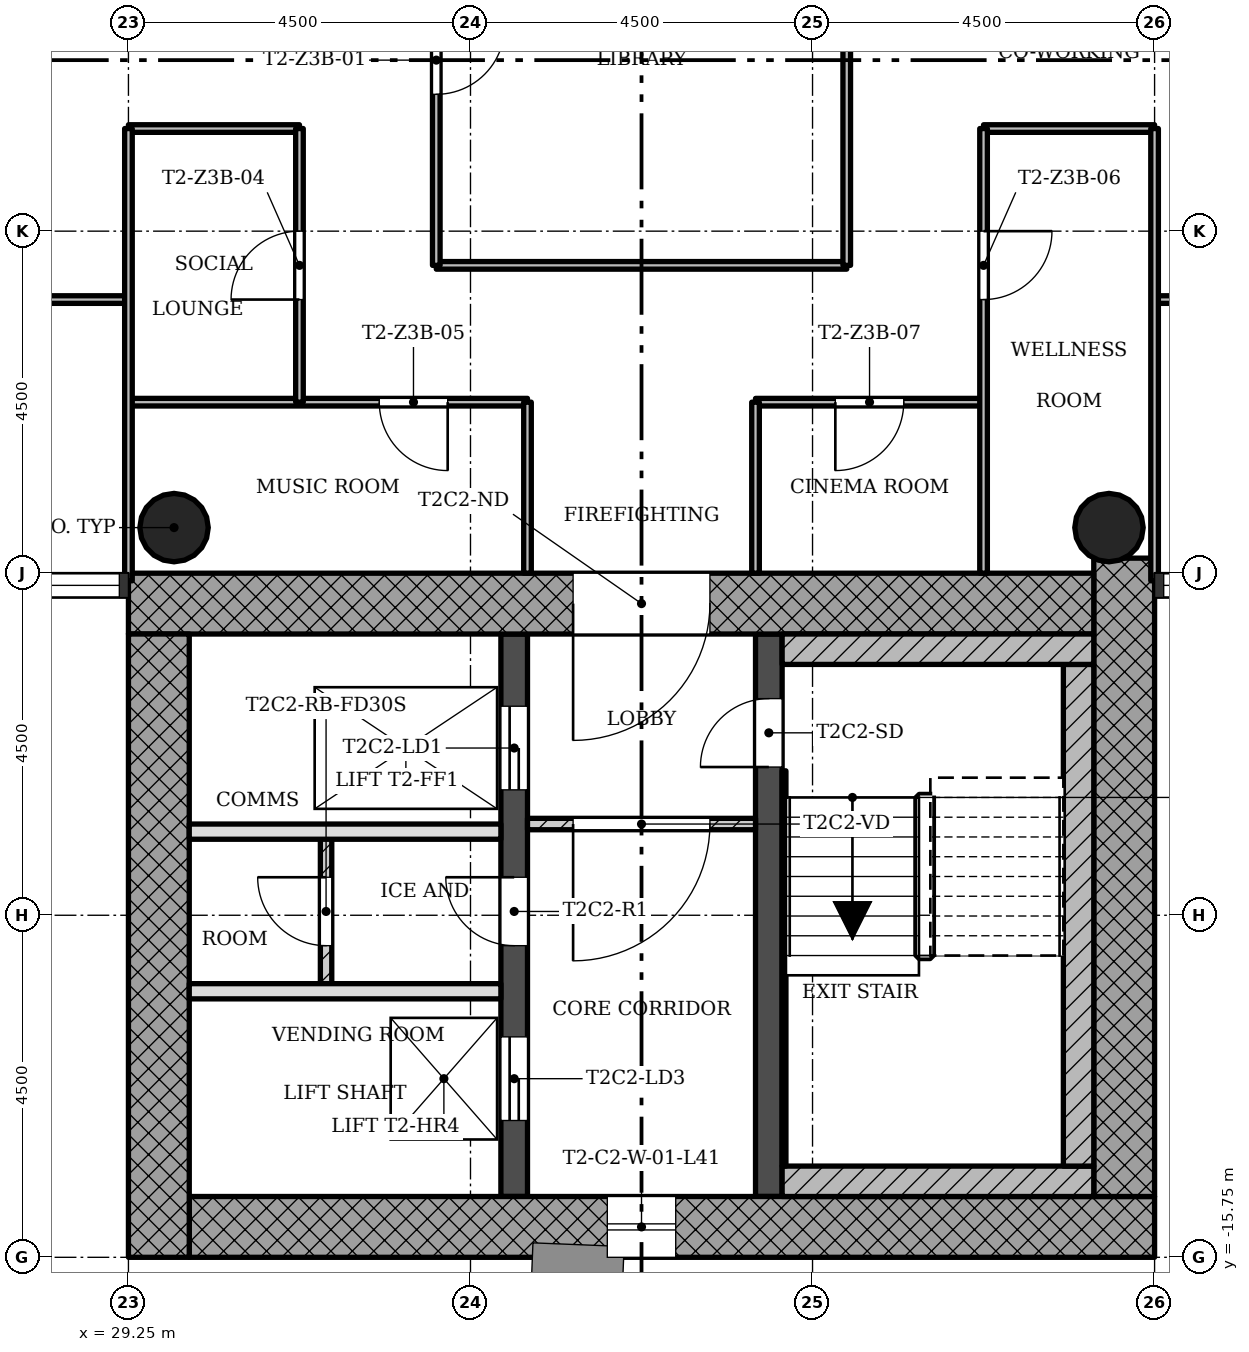
"""IFC4 building model, lengths in metres.
Left out: names, types, materials, properties, quantities, classifications, styles, units other than length and angle.
Written with IfcOpenShell. Run it as: python <this file> out.ifc"""

import sys

from ifc_helpers import new_model, si_unit, direction, frame, frame_2d, origin, origin_2d, place, context, subcontext, project, spatial, rectangle, hollow_circle, extrude, element, fill, save


model = new_model("IFC4")
c1 = context("Model", 3, precision=1e-05, world=origin(), true_north=direction((0.0, 1.0)))
c2 = subcontext(c1, "Body", "Model", "MODEL_VIEW")
j1 = project(units=[si_unit("LENGTHUNIT", "METRE"), si_unit("PLANEANGLEUNIT", "RADIAN")], contexts=[c1])
p1 = place(None, origin())
s1 = spatial("IfcSite", under=j1, at=p1, CompositionType="ELEMENT")
p2 = place(p1, origin())
s2 = spatial("IfcBuilding", under=s1, at=p2, CompositionType="ELEMENT")
p3 = place(p2, frame((0.0, 0.0, 150.7)))
s3 = spatial("IfcBuildingStorey", under=s2, at=p3, CompositionType="ELEMENT", Elevation=150.7)
p4 = place(p3, frame((30.05, -15.35, 0.0), z_axis=(0.0, 0.0, 1.0), x_axis=(1.0, 0.0, 0.0)))
e1 = element("IfcWall", 1, at=p4, inside=s3, PredefinedType="SHEAR", context=c2, shape_type="SweptSolid", body=[
    extrude(rectangle(XDim=12.7, YDim=0.8, at=frame_2d((6.35, 0.0))), origin(), (0.0, 0.0, 1.0), 3.4),
])
p5 = place(p4, frame((5.5, 0.0, 0.45)))
e2 = element("IfcOpeningElement", 2, at=p5, cuts=e1, PredefinedType="OPENING", context=c2, shape_type="SweptSolid", body=[
    extrude(rectangle(XDim=0.9, YDim=2.4, at=frame_2d((0.45, 1.2))), frame((0.0, 0.41, 0.0), z_axis=(0.0, -1.0, 0.0), x_axis=(1.0, 0.0, 0.0)), (0.0, 0.0, 1.0), 0.82),
])
p6 = place(p3, frame((42.35, -14.95, 0.0), z_axis=(0.0, 0.0, 1.0), x_axis=(0.0, 1.0, 0.0)))
e3 = element("IfcWall", 3, at=p6, inside=s3, PredefinedType="SHEAR", context=c2, shape_type="SweptSolid", body=[
    extrude(rectangle(XDim=8.398, YDim=0.8, at=frame_2d((4.199, 0.0))), origin(), (0.0, 0.0, 1.0), 3.4),
])
p7 = place(p3, frame((41.95, -7.15, 0.0), z_axis=(0.0, 0.0, 1.0), x_axis=(-1.0, 0.0, 0.0)))
e4 = element("IfcWall", 4, at=p7, inside=s3, PredefinedType="SHEAR", context=c2, shape_type="SweptSolid", body=[
    extrude(rectangle(XDim=12.7, YDim=0.8, at=frame_2d((6.35, 0.0))), origin(), (0.0, 0.0, 1.0), 3.4),
])
p8 = place(p7, frame((5.05, 0.0, 0.0)))
e5 = element("IfcOpeningElement", 5, at=p8, cuts=e4, PredefinedType="OPENING", context=c2, shape_type="SweptSolid", body=[
    extrude(rectangle(XDim=1.8, YDim=2.1, at=frame_2d((0.9, 1.05))), frame((0.0, 0.41, 0.0), z_axis=(0.0, -1.0, 0.0), x_axis=(1.0, 0.0, 0.0)), (0.0, 0.0, 1.0), 0.82),
])
p9 = place(p3, frame((29.65, -7.55, 0.0), z_axis=(0.0, 0.0, 1.0), x_axis=(0.0, -1.0, 0.0)))
e6 = element("IfcWall", 6, at=p9, inside=s3, PredefinedType="SHEAR", context=c2, shape_type="SweptSolid", body=[
    extrude(rectangle(XDim=8.2, YDim=0.8, at=frame_2d((4.1, 0.0))), origin(), (0.0, 0.0, 1.0), 3.4),
])
p10 = place(p3, frame((34.325, -14.95, 0.0), z_axis=(0.0, 0.0, 1.0), x_axis=(0.0, 1.0, 0.0)))
e7 = element("IfcWall", 7, at=p10, inside=s3, PredefinedType="SHEAR", context=c2, shape_type="SweptSolid", body=[
    extrude(rectangle(XDim=7.4, YDim=0.35, at=frame_2d((3.7, 0.0))), origin(), (0.0, 0.0, 1.0), 3.4),
])
p11 = place(p10, frame((5.35, 0.0, 0.0)))
e8 = element("IfcOpeningElement", 8, at=p11, cuts=e7, PredefinedType="OPENING", context=c2, shape_type="SweptSolid", body=[
    extrude(rectangle(XDim=1.1, YDim=2.1, at=frame_2d((0.55, 1.05))), frame((0.0, 0.185, 0.0), z_axis=(0.0, -1.0, 0.0), x_axis=(1.0, 0.0, 0.0)), (0.0, 0.0, 1.0), 0.37),
])
p12 = place(p10, frame((1.0, 0.0, 0.0)))
e9 = element("IfcOpeningElement", 9, at=p12, cuts=e7, PredefinedType="OPENING", context=c2, shape_type="SweptSolid", body=[
    extrude(rectangle(XDim=1.1, YDim=2.1, at=frame_2d((0.55, 1.05))), frame((0.0, 0.185, 0.0), z_axis=(0.0, -1.0, 0.0), x_axis=(1.0, 0.0, 0.0)), (0.0, 0.0, 1.0), 0.37),
])
p13 = place(p10, frame((3.3, 0.0, 0.0)))
e10 = element("IfcOpeningElement", 10, at=p13, cuts=e7, PredefinedType="OPENING", context=c2, shape_type="SweptSolid", body=[
    extrude(rectangle(XDim=0.9, YDim=2.1, at=frame_2d((0.45, 1.05))), frame((0.0, 0.185, 0.0), z_axis=(0.0, -1.0, 0.0), x_axis=(1.0, 0.0, 0.0)), (0.0, 0.0, 1.0), 0.37),
])
p14 = place(p3, frame((37.675, -14.95, 0.0), z_axis=(0.0, 0.0, 1.0), x_axis=(0.0, 1.0, 0.0)))
e11 = element("IfcWall", 11, at=p14, inside=s3, PredefinedType="SHEAR", context=c2, shape_type="SweptSolid", body=[
    extrude(rectangle(XDim=7.4, YDim=0.35, at=frame_2d((3.7, 0.0))), origin(), (0.0, 0.0, 1.0), 3.4),
])
p15 = place(p14, frame((5.65, 0.0, 0.0)))
e12 = element("IfcOpeningElement", 12, at=p15, cuts=e11, PredefinedType="OPENING", context=c2, shape_type="SweptSolid", body=[
    extrude(rectangle(XDim=0.9, YDim=2.1, at=frame_2d((0.45, 1.05))), frame((0.0, 0.185, 0.0), z_axis=(0.0, -1.0, 0.0), x_axis=(1.0, 0.0, 0.0)), (0.0, 0.0, 1.0), 0.37),
])
for number, where, z_axis, x_axis in (
    (13, (42.15, -6.15, 0.0), (0.0, 0.0, 1.0), (1.0, 0.0, 0.0)),
    (14, (29.85, -6.15, 0.0), (0.0, 0.0, 1.0), (1.0, 0.0, 0.0)),
):
    element("IfcColumn", number, at=place(p3, frame(where, z_axis=z_axis, x_axis=x_axis)), inside=s3, PredefinedType="COLUMN", context=c2, shape_type="SweptSolid", body=[
        extrude(hollow_circle(Radius=0.45, WallThickness=0.032, at=origin_2d()), origin(), (0.0, 0.0, 1.0), 3.4),
    ])
p16 = place(p3, frame((34.5, -10.05, 0.0), z_axis=(0.0, 0.0, 1.0), x_axis=(1.0, 0.0, 0.0)))
e15 = element("IfcWall", 15, at=p16, inside=s3, PredefinedType="PARTITIONING", context=c2, shape_type="SweptSolid", body=[
    extrude(rectangle(XDim=3.0, YDim=0.15, at=frame_2d((1.5, 0.0))), origin(), (0.0, 0.0, 1.0), 3.0),
])
p17 = place(p16, frame((0.6, 0.0, 0.0)))
e16 = element("IfcOpeningElement", 16, at=p17, cuts=e15, PredefinedType="OPENING", context=c2, shape_type="SweptSolid", body=[
    extrude(rectangle(XDim=1.8, YDim=2.1, at=frame_2d((0.9, 1.05))), frame((0.0, 0.085, 0.0), z_axis=(0.0, -1.0, 0.0), x_axis=(1.0, 0.0, 0.0)), (0.0, 0.0, 1.0), 0.17),
])
for number, where, z_axis, x_axis in (
    (17, (30.05, -12.25, 0.0), (0.0, 0.0, 1.0), (1.0, 0.0, 0.0)),
    (18, (30.05, -10.15, 0.0), (0.0, 0.0, 1.0), (1.0, 0.0, 0.0)),
):
    element("IfcWall", number, at=place(p3, frame(where, z_axis=z_axis, x_axis=x_axis)), inside=s3, PredefinedType="SOLIDWALL", context=c2, shape_type="SweptSolid", body=[
        extrude(rectangle(XDim=4.1, YDim=0.2, at=frame_2d((2.05, 0.0))), origin(), (0.0, 0.0, 1.0), 3.0),
    ])
p18 = place(p3, frame((31.85, -10.15, 0.0), z_axis=(0.0, 0.0, 1.0), x_axis=(0.0, -1.0, 0.0)))
e19 = element("IfcWall", 19, at=p18, inside=s3, PredefinedType="PARTITIONING", context=c2, shape_type="SweptSolid", body=[
    extrude(rectangle(XDim=2.1, YDim=0.15, at=frame_2d((1.05, 0.0))), origin(), (0.0, 0.0, 1.0), 3.0),
])
p19 = place(p18, frame((0.6, 0.0, 0.0)))
e20 = element("IfcOpeningElement", 20, at=p19, cuts=e19, PredefinedType="OPENING", context=c2, shape_type="SweptSolid", body=[
    extrude(rectangle(XDim=0.9, YDim=2.1, at=frame_2d((0.45, 1.05))), frame((0.0, 0.085, 0.0), z_axis=(0.0, -1.0, 0.0), x_axis=(1.0, 0.0, 0.0)), (0.0, 0.0, 1.0), 0.17),
])
p20 = place(p3, frame((40.5, -4.5, 0.0), z_axis=(0.0, 0.0, 1.0), x_axis=(-1.0, 0.0, 0.0)))
e21 = element("IfcWall", 21, at=p20, inside=s3, PredefinedType="PARTITIONING", context=c2, shape_type="SweptSolid", body=[
    extrude(rectangle(XDim=3.0, YDim=0.1, at=frame_2d((1.5, 0.0))), origin(), (0.0, 0.0, 1.0), 3.0),
])
p21 = place(p20, frame((1.05, 0.0, 0.0)))
e22 = element("IfcOpeningElement", 22, at=p21, cuts=e21, PredefinedType="OPENING", context=c2, shape_type="SweptSolid", body=[
    extrude(rectangle(XDim=0.9, YDim=2.1, at=frame_2d((0.45, 1.05))), frame((0.0, 0.06, 0.0), z_axis=(0.0, -1.0, 0.0), x_axis=(1.0, 0.0, 0.0)), (0.0, 0.0, 1.0), 0.12),
])
p22 = place(p3, frame((34.5, -4.5, 0.0), z_axis=(0.0, 0.0, 1.0), x_axis=(-1.0, 0.0, 0.0)))
e23 = element("IfcWall", 23, at=p22, inside=s3, PredefinedType="PARTITIONING", context=c2, shape_type="SweptSolid", body=[
    extrude(rectangle(XDim=5.25, YDim=0.1, at=frame_2d((2.625, 0.0))), origin(), (0.0, 0.0, 1.0), 3.0),
])
p23 = place(p22, frame((1.05, 0.0, 0.0)))
e24 = element("IfcOpeningElement", 24, at=p23, cuts=e23, PredefinedType="OPENING", context=c2, shape_type="SweptSolid", body=[
    extrude(rectangle(XDim=0.9, YDim=2.1, at=frame_2d((0.45, 1.05))), frame((0.0, 0.06, 0.0), z_axis=(0.0, -1.0, 0.0), x_axis=(1.0, 0.0, 0.0)), (0.0, 0.0, 1.0), 0.12),
])
p24 = place(p3, frame((47.25, -3.15, 0.0), z_axis=(0.0, 0.0, 1.0), x_axis=(-1.0, 0.0, 0.0)))
e25 = element("IfcWall", 25, at=p24, inside=s3, PredefinedType="PARTITIONING", context=c2, shape_type="SweptSolid", body=[
    extrude(rectangle(XDim=4.5, YDim=0.1, at=frame_2d((2.25, 0.0))), origin(), (0.0, 0.0, 1.0), 3.0),
])
p25 = place(p24, frame((1.8, 0.0, 0.0)))
e26 = element("IfcOpeningElement", 26, at=p25, cuts=e25, PredefinedType="OPENING", context=c2, shape_type="SweptSolid", body=[
    extrude(rectangle(XDim=0.9, YDim=2.1, at=frame_2d((0.45, 1.05))), frame((0.0, 0.06, 0.0), z_axis=(0.0, -1.0, 0.0), x_axis=(1.0, 0.0, 0.0)), (0.0, 0.0, 1.0), 0.12),
])
p26 = place(p3, frame((29.25, -3.15, 0.0), z_axis=(0.0, 0.0, 1.0), x_axis=(-1.0, 0.0, 0.0)))
e27 = element("IfcWall", 27, at=p26, inside=s3, PredefinedType="PARTITIONING", context=c2, shape_type="SweptSolid", body=[
    extrude(rectangle(XDim=9.0, YDim=0.1, at=frame_2d((4.5, 0.0))), origin(), (0.0, 0.0, 1.0), 3.0),
])
p27 = place(p26, frame((1.8, 0.0, 0.0)))
e28 = element("IfcOpeningElement", 28, at=p27, cuts=e27, PredefinedType="OPENING", context=c2, shape_type="SweptSolid", body=[
    extrude(rectangle(XDim=0.9, YDim=2.1, at=frame_2d((0.45, 1.05))), frame((0.0, 0.06, 0.0), z_axis=(0.0, -1.0, 0.0), x_axis=(1.0, 0.0, 0.0)), (0.0, 0.0, 1.0), 0.12),
])
p28 = place(p26, frame((6.3, 0.0, 0.0)))
e29 = element("IfcOpeningElement", 29, at=p28, cuts=e27, PredefinedType="OPENING", context=c2, shape_type="SweptSolid", body=[
    extrude(rectangle(XDim=0.9, YDim=2.1, at=frame_2d((0.45, 1.05))), frame((0.0, 0.06, 0.0), z_axis=(0.0, -1.0, 0.0), x_axis=(1.0, 0.0, 0.0)), (0.0, 0.0, 1.0), 0.12),
])
p29 = place(p3, frame((38.7, -2.7, 0.0), z_axis=(0.0, 0.0, 1.0), x_axis=(-1.0, 0.0, 0.0)))
e30 = element("IfcWall", 30, at=p29, inside=s3, PredefinedType="PARTITIONING", context=c2, shape_type="SweptSolid", body=[
    extrude(rectangle(XDim=5.4, YDim=0.1, at=frame_2d((2.7, 0.0))), origin(), (0.0, 0.0, 1.0), 3.0),
])
for number, where, z_axis, x_axis in (
    (31, (42.75, -0.9, 0.0), (0.0, 0.0, 1.0), (-1.0, 0.0, 0.0)),
    (32, (31.5, -0.9, 0.0), (0.0, 0.0, 1.0), (-1.0, 0.0, 0.0)),
):
    element("IfcWall", number, at=place(p3, frame(where, z_axis=z_axis, x_axis=x_axis)), inside=s3, PredefinedType="PARTITIONING", context=c2, shape_type="SweptSolid", body=[
        extrude(rectangle(XDim=2.25, YDim=0.1, at=frame_2d((1.125, 0.0))), origin(), (0.0, 0.0, 1.0), 3.0),
    ])
p30 = place(p3, frame((42.75, -6.85, 0.0), z_axis=(0.0, 0.0, 1.0), x_axis=(0.0, 1.0, 0.0)))
e33 = element("IfcWall", 33, at=p30, inside=s3, PredefinedType="PARTITIONING", context=c2, shape_type="SweptSolid", body=[
    extrude(rectangle(XDim=5.95, YDim=0.1, at=frame_2d((2.975, 0.0))), origin(), (0.0, 0.0, 1.0), 3.0),
])
p31 = place(p3, frame((40.5, -6.75, 0.0), z_axis=(0.0, 0.0, 1.0), x_axis=(0.0, 1.0, 0.0)))
e34 = element("IfcWall", 34, at=p31, inside=s3, PredefinedType="PARTITIONING", context=c2, shape_type="SweptSolid", body=[
    extrude(rectangle(XDim=5.85, YDim=0.1, at=frame_2d((2.925, 0.0))), origin(), (0.0, 0.0, 1.0), 3.0),
])
p32 = place(p31, frame((3.6, 0.0, 0.0)))
e35 = element("IfcOpeningElement", 35, at=p32, cuts=e34, PredefinedType="OPENING", context=c2, shape_type="SweptSolid", body=[
    extrude(rectangle(XDim=0.9, YDim=2.1, at=frame_2d((0.45, 1.05))), frame((0.0, 0.06, 0.0), z_axis=(0.0, -1.0, 0.0), x_axis=(1.0, 0.0, 0.0)), (0.0, 0.0, 1.0), 0.12),
])
p33 = place(p3, frame((38.7, -2.7, 0.0), z_axis=(0.0, 0.0, 1.0), x_axis=(0.0, 1.0, 0.0)))
e36 = element("IfcWall", 36, at=p33, inside=s3, PredefinedType="PARTITIONING", context=c2, shape_type="SweptSolid", body=[
    extrude(rectangle(XDim=5.4, YDim=0.1, at=frame_2d((2.7, 0.0))), origin(), (0.0, 0.0, 1.0), 3.0),
])
for number, where, z_axis, x_axis in (
    (37, (37.5, -6.75, 0.0), (0.0, 0.0, 1.0), (0.0, 1.0, 0.0)),
    (38, (34.5, -6.75, 0.0), (0.0, 0.0, 1.0), (0.0, 1.0, 0.0)),
):
    element("IfcWall", number, at=place(p3, frame(where, z_axis=z_axis, x_axis=x_axis)), inside=s3, PredefinedType="PARTITIONING", context=c2, shape_type="SweptSolid", body=[
        extrude(rectangle(XDim=2.25, YDim=0.1, at=frame_2d((1.125, 0.0))), origin(), (0.0, 0.0, 1.0), 3.0),
    ])
p34 = place(p3, frame((33.3, -2.7, 0.0), z_axis=(0.0, 0.0, 1.0), x_axis=(0.0, 1.0, 0.0)))
e39 = element("IfcWall", 39, at=p34, inside=s3, PredefinedType="PARTITIONING", context=c2, shape_type="SweptSolid", body=[
    extrude(rectangle(XDim=5.4, YDim=0.1, at=frame_2d((2.7, 0.0))), origin(), (0.0, 0.0, 1.0), 3.0),
])
p35 = place(p34, frame((2.25, 0.0, 0.0)))
e40 = element("IfcOpeningElement", 40, at=p35, cuts=e39, PredefinedType="OPENING", context=c2, shape_type="SweptSolid", body=[
    extrude(rectangle(XDim=0.9, YDim=2.1, at=frame_2d((0.45, 1.05))), frame((0.0, 0.06, 0.0), z_axis=(0.0, -1.0, 0.0), x_axis=(1.0, 0.0, 0.0)), (0.0, 0.0, 1.0), 0.12),
])
p36 = place(p3, frame((31.5, -4.5, 0.0), z_axis=(0.0, 0.0, 1.0), x_axis=(0.0, 1.0, 0.0)))
e41 = element("IfcWall", 41, at=p36, inside=s3, PredefinedType="PARTITIONING", context=c2, shape_type="SweptSolid", body=[
    extrude(rectangle(XDim=3.6, YDim=0.1, at=frame_2d((1.8, 0.0))), origin(), (0.0, 0.0, 1.0), 3.0),
])
p37 = place(p36, frame((1.35, 0.0, 0.0)))
e42 = element("IfcOpeningElement", 42, at=p37, cuts=e41, PredefinedType="OPENING", context=c2, shape_type="SweptSolid", body=[
    extrude(rectangle(XDim=0.9, YDim=2.1, at=frame_2d((0.45, 1.05))), frame((0.0, 0.06, 0.0), z_axis=(0.0, -1.0, 0.0), x_axis=(1.0, 0.0, 0.0)), (0.0, 0.0, 1.0), 0.12),
])
p38 = place(p3, frame((29.25, -6.85, 0.0), z_axis=(0.0, 0.0, 1.0), x_axis=(0.0, 1.0, 0.0)))
e43 = element("IfcWall", 43, at=p38, inside=s3, PredefinedType="PARTITIONING", context=c2, shape_type="SweptSolid", body=[
    extrude(rectangle(XDim=5.95, YDim=0.1, at=frame_2d((2.975, 0.0))), origin(), (0.0, 0.0, 1.0), 3.0),
])
p39 = place(p3, frame((37.85, -14.75, 0.0), z_axis=(0.0, 0.0, 1.0), x_axis=(1.0, 0.0, 0.0)))
e44 = element("IfcWall", 44, at=p39, inside=s3, PredefinedType="SHEAR", context=c2, shape_type="SweptSolid", body=[
    extrude(rectangle(XDim=4.1, YDim=0.4, at=frame_2d((2.05, 0.0))), origin(), (0.0, 0.0, 1.0), 3.4),
])
p40 = place(p3, frame((41.75, -7.95, 0.0), z_axis=(0.0, 0.0, 1.0), x_axis=(0.0, -1.0, 0.0)))
e45 = element("IfcWall", 45, at=p40, inside=s3, PredefinedType="SHEAR", context=c2, shape_type="SweptSolid", body=[
    extrude(rectangle(XDim=6.6, YDim=0.4, at=frame_2d((3.3, 0.0))), origin(), (0.0, 0.0, 1.0), 3.4),
])
p41 = place(p3, frame((37.85, -7.75, 0.0), z_axis=(0.0, 0.0, 1.0), x_axis=(1.0, 0.0, 0.0)))
e46 = element("IfcWall", 46, at=p41, inside=s3, PredefinedType="SHEAR", context=c2, shape_type="SweptSolid", body=[
    extrude(rectangle(XDim=4.1, YDim=0.4, at=frame_2d((2.05, 0.0))), origin(), (0.0, 0.0, 1.0), 3.4),
])
p42 = place(p3, frame((37.875, -9.35, 0.0), z_axis=(0.0, 0.0, 1.0), x_axis=(0.0, -1.0, 0.0)))
e47 = element("IfcWall", 47, at=p42, inside=s3, PredefinedType="SHEAR", context=c2, shape_type="SweptSolid", body=[
    extrude(rectangle(XDim=5.2, YDim=0.05, at=frame_2d((2.6, 0.0))), origin(), (0.0, 0.0, 1.0), 3.4),
])
p43 = place(p5, origin())
e48 = element("IfcWindow", 48, at=p43, inside=s3, PartitioningType="SINGLE_PANEL", PredefinedType="WINDOW", context=c2, shape_type="SweptSolid", body=[
    extrude(rectangle(XDim=0.9, YDim=2.4, at=frame_2d((0.45, 1.2))), frame((0.0, 0.03, 0.0), z_axis=(0.0, -1.0, 0.0), x_axis=(1.0, 0.0, 0.0)), (0.0, 0.0, 1.0), 0.06),
])
fill(e2, e48)
p44 = place(p17, origin())
e49 = element("IfcDoor", 49, at=p44, inside=s3, OperationType="SINGLE_SWING_LEFT", PredefinedType="DOOR", context=c2, shape_type="SweptSolid", body=[
    extrude(rectangle(XDim=1.8, YDim=2.1, at=frame_2d((0.9, 1.05))), frame((0.0, 0.025, 0.0), z_axis=(0.0, -1.0, 0.0), x_axis=(1.0, 0.0, 0.0)), (0.0, 0.0, 1.0), 0.05),
])
fill(e16, e49)
p45 = place(p19, origin())
e50 = element("IfcDoor", 50, at=p45, inside=s3, OperationType="SINGLE_SWING_LEFT", PredefinedType="DOOR", context=c2, shape_type="SweptSolid", body=[
    extrude(rectangle(XDim=0.9, YDim=2.1, at=frame_2d((0.45, 1.05))), frame((0.0, 0.025, 0.0), z_axis=(0.0, -1.0, 0.0), x_axis=(1.0, 0.0, 0.0)), (0.0, 0.0, 1.0), 0.05),
])
fill(e20, e50)
p46 = place(p35, origin())
e51 = element("IfcDoor", 51, at=p46, inside=s3, OperationType="SINGLE_SWING_RIGHT", PredefinedType="DOOR", context=c2, shape_type="SweptSolid", body=[
    extrude(rectangle(XDim=0.9, YDim=2.1, at=frame_2d((0.45, 1.05))), frame((0.0, 0.025, 0.0), z_axis=(0.0, -1.0, 0.0), x_axis=(1.0, 0.0, 0.0)), (0.0, 0.0, 1.0), 0.05),
])
fill(e40, e51)
p47 = place(p37, origin())
e52 = element("IfcDoor", 52, at=p47, inside=s3, OperationType="SINGLE_SWING_RIGHT", PredefinedType="DOOR", context=c2, shape_type="SweptSolid", body=[
    extrude(rectangle(XDim=0.9, YDim=2.1, at=frame_2d((0.45, 1.05))), frame((0.0, 0.025, 0.0), z_axis=(0.0, -1.0, 0.0), x_axis=(1.0, 0.0, 0.0)), (0.0, 0.0, 1.0), 0.05),
])
fill(e42, e52)
p48 = place(p23, origin())
e53 = element("IfcDoor", 53, at=p48, inside=s3, OperationType="SINGLE_SWING_RIGHT", PredefinedType="DOOR", context=c2, shape_type="SweptSolid", body=[
    extrude(rectangle(XDim=0.9, YDim=2.1, at=frame_2d((0.45, 1.05))), frame((0.0, 0.025, 0.0), z_axis=(0.0, -1.0, 0.0), x_axis=(1.0, 0.0, 0.0)), (0.0, 0.0, 1.0), 0.05),
])
fill(e24, e53)
p49 = place(p32, origin())
e54 = element("IfcDoor", 54, at=p49, inside=s3, OperationType="SINGLE_SWING_RIGHT", PredefinedType="DOOR", context=c2, shape_type="SweptSolid", body=[
    extrude(rectangle(XDim=0.9, YDim=2.1, at=frame_2d((0.45, 1.05))), frame((0.0, 0.025, 0.0), z_axis=(0.0, -1.0, 0.0), x_axis=(1.0, 0.0, 0.0)), (0.0, 0.0, 1.0), 0.05),
])
fill(e35, e54)
p50 = place(p21, origin())
e55 = element("IfcDoor", 55, at=p50, inside=s3, OperationType="SINGLE_SWING_LEFT", PredefinedType="DOOR", context=c2, shape_type="SweptSolid", body=[
    extrude(rectangle(XDim=0.9, YDim=2.1, at=frame_2d((0.45, 1.05))), frame((0.0, 0.025, 0.0), z_axis=(0.0, -1.0, 0.0), x_axis=(1.0, 0.0, 0.0)), (0.0, 0.0, 1.0), 0.05),
])
fill(e22, e55)
p51 = place(p15, origin())
e56 = element("IfcDoor", 56, at=p51, inside=s3, OperationType="SINGLE_SWING_RIGHT", PredefinedType="DOOR", context=c2, shape_type="SweptSolid", body=[
    extrude(rectangle(XDim=0.9, YDim=2.1, at=frame_2d((0.45, 1.05))), frame((0.0, 0.025, 0.0), z_axis=(0.0, -1.0, 0.0), x_axis=(1.0, 0.0, 0.0)), (0.0, 0.0, 1.0), 0.05),
])
fill(e12, e56)
p52 = place(p11, origin())
e57 = element("IfcDoor", 57, at=p52, inside=s3, OperationType="SLIDING_TO_LEFT", PredefinedType="DOOR", context=c2, shape_type="SweptSolid", body=[
    extrude(rectangle(XDim=1.1, YDim=2.1, at=frame_2d((0.55, 1.05))), frame((0.0, 0.025, 0.0), z_axis=(0.0, -1.0, 0.0), x_axis=(1.0, 0.0, 0.0)), (0.0, 0.0, 1.0), 0.05),
])
fill(e8, e57)
p53 = place(p12, origin())
e58 = element("IfcDoor", 58, at=p53, inside=s3, OperationType="SLIDING_TO_LEFT", PredefinedType="DOOR", context=c2, shape_type="SweptSolid", body=[
    extrude(rectangle(XDim=1.1, YDim=2.1, at=frame_2d((0.55, 1.05))), frame((0.0, 0.025, 0.0), z_axis=(0.0, -1.0, 0.0), x_axis=(1.0, 0.0, 0.0)), (0.0, 0.0, 1.0), 0.05),
])
fill(e9, e58)
p54 = place(p13, origin())
e59 = element("IfcDoor", 59, at=p54, inside=s3, OperationType="SINGLE_SWING_LEFT", PredefinedType="DOOR", context=c2, shape_type="SweptSolid", body=[
    extrude(rectangle(XDim=0.9, YDim=2.1, at=frame_2d((0.45, 1.05))), frame((0.0, 0.025, 0.0), z_axis=(0.0, -1.0, 0.0), x_axis=(1.0, 0.0, 0.0)), (0.0, 0.0, 1.0), 0.05),
])
fill(e10, e59)
p55 = place(p8, origin())
e60 = element("IfcDoor", 60, at=p55, inside=s3, OperationType="SINGLE_SWING_LEFT", PredefinedType="DOOR", context=c2, shape_type="SweptSolid", body=[
    extrude(rectangle(XDim=1.8, YDim=2.1, at=frame_2d((0.9, 1.05))), frame((0.0, 0.025, 0.0), z_axis=(0.0, -1.0, 0.0), x_axis=(1.0, 0.0, 0.0)), (0.0, 0.0, 1.0), 0.05),
])
fill(e5, e60)
save(model, sys.argv[1])
